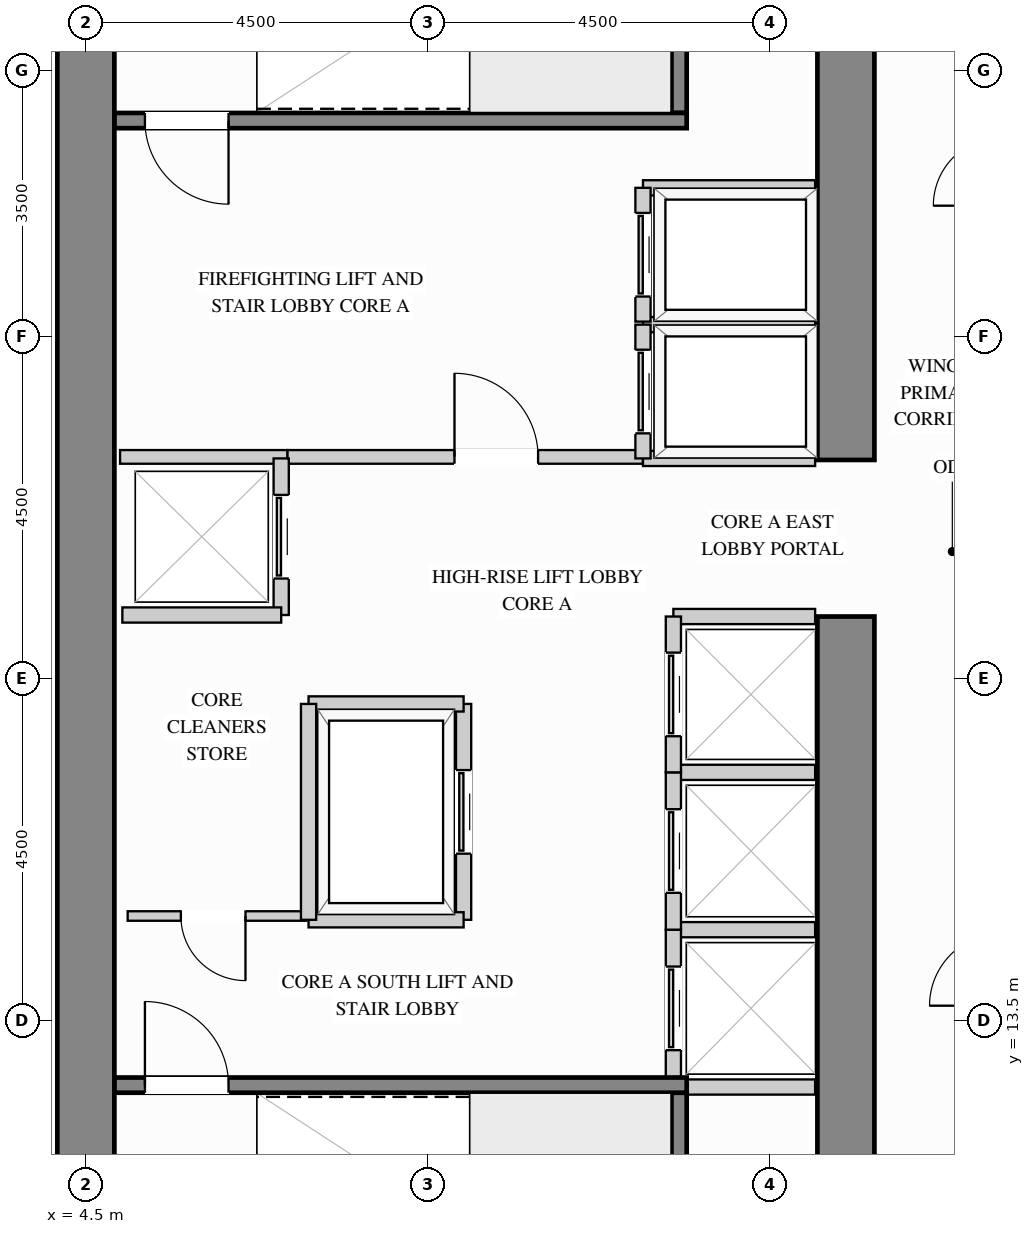
"""IFC4 building model, lengths in metres.
Left out: names, types, materials, properties, quantities, classifications, styles, units other than length and angle.
Written with IfcOpenShell. Run it as: python <this file> out.ifc"""

import sys

from ifc_helpers import new_model, si_unit, direction, frame, frame_2d, origin, place, context, subcontext, project, spatial, rectangle, extrude, source, transform, mapped, element, fill, save


model = new_model("IFC4")
c1 = context("Model", 3, precision=1e-05, world=origin(), true_north=direction((0.0, 1.0)))
c2 = subcontext(c1, "Body", "Model", "MODEL_VIEW")
j1 = project(units=[si_unit("LENGTHUNIT", "METRE"), si_unit("PLANEANGLEUNIT", "RADIAN")], contexts=[c1])
p1 = place(None, origin())
s1 = spatial("IfcSite", under=j1, at=p1, CompositionType="ELEMENT")
p2 = place(p1, origin())
s2 = spatial("IfcBuilding", under=s1, at=p2, CompositionType="ELEMENT")
p3 = place(p2, frame((0.0, 0.0, 91.8)))
s3 = spatial("IfcBuildingStorey", under=s2, at=p3, CompositionType="ELEMENT", Elevation=91.8)
m1 = source(origin(), c2, "Body", "SweptSolid", [
    extrude(rectangle(XDim=9.945, YDim=0.75, at=frame_2d((4.973, 0.0))), origin(), (0.0, 0.0, 1.0), 3.38),
])
p4 = place(p3, frame((14.5, 8.875, 0.0), z_axis=(0.0, 0.0, 1.0), x_axis=(0.0, 1.0, 0.0)))
e1 = element("IfcWall", 1, at=p4, inside=s3, PredefinedType="SHEAR", context=c2, shape_type="MappedRepresentation", body=[
    mapped(m1, transform((0.0, 0.0, 0.0), x_axis=(1.0, 0.0, 0.0), y_axis=(0.0, 1.0, 0.0), z_axis=(0.0, 0.0, 1.0))),
])
m2 = source(origin(), c2, "Body", "SweptSolid", [
    extrude(rectangle(XDim=8.245, YDim=0.75, at=frame_2d((4.123, 0.0))), origin(), (0.0, 0.0, 1.0), 3.38),
])
p5 = place(p3, frame((14.5, 20.88, 0.0), z_axis=(0.0, 0.0, 1.0), x_axis=(0.0, 1.0, 0.0)))
e2 = element("IfcWall", 2, at=p5, inside=s3, PredefinedType="SHEAR", context=c2, shape_type="MappedRepresentation", body=[
    mapped(m2, transform((0.0, 0.0, 0.0), x_axis=(1.0, 0.0, 0.0), y_axis=(0.0, 1.0, 0.0), z_axis=(0.0, 0.0, 1.0))),
])
m3 = source(origin(), c2, "Body", "SweptSolid", [
    extrude(rectangle(XDim=20.25, YDim=0.75, at=frame_2d((10.125, 0.0))), origin(), (0.0, 0.0, 1.0), 3.38),
])
p6 = place(p3, frame((4.5, 8.875, 0.0), z_axis=(0.0, 0.0, 1.0), x_axis=(0.0, 1.0, 0.0)))
e3 = element("IfcWall", 3, at=p6, inside=s3, PredefinedType="SHEAR", context=c2, shape_type="MappedRepresentation", body=[
    mapped(m3, transform((0.0, 0.0, 0.0), x_axis=(1.0, 0.0, 0.0), y_axis=(0.0, 1.0, 0.0), z_axis=(0.0, 0.0, 1.0))),
])
p7 = place(p3, frame((7.15, 20.92, 0.0), z_axis=(0.0, 0.0, 1.0), x_axis=(1.0, 0.0, 0.0)))
e4 = element("IfcWall", 4, at=p7, inside=s3, PredefinedType="PARTITIONING", context=c2, shape_type="SweptSolid", body=[
    extrude(rectangle(XDim=4.68, YDim=0.18, at=frame_2d((2.34, 0.0))), origin(), (0.0, 0.0, 1.0), 3.365),
])
p8 = place(p7, frame((2.2, 0.0, 0.0)))
e5 = element("IfcOpeningElement", 5, at=p8, cuts=e4, PredefinedType="OPENING", context=c2, shape_type="SweptSolid", body=[
    extrude(rectangle(XDim=1.1, YDim=2.15, at=frame_2d((0.55, 1.075))), frame((0.0, 0.1, 0.0), z_axis=(0.0, -1.0, 0.0), x_axis=(1.0, 0.0, 0.0)), (0.0, 0.0, 1.0), 0.2),
])
m4 = source(origin(), c2, "Body", "SweptSolid", [
    extrude(rectangle(XDim=2.2, YDim=0.18, at=frame_2d((1.1, 0.0))), origin(), (0.0, 0.0, 1.0), 3.365),
])
p9 = place(p3, frame((4.95, 20.92, 0.0), z_axis=(0.0, 0.0, 1.0), x_axis=(1.0, 0.0, 0.0)))
e6 = element("IfcWall", 6, at=p9, inside=s3, PredefinedType="PARTITIONING", context=c2, shape_type="MappedRepresentation", body=[
    mapped(m4, transform((0.0, 0.0, 0.0), x_axis=(1.0, 0.0, 0.0), y_axis=(0.0, 1.0, 0.0), z_axis=(0.0, 0.0, 1.0))),
])
p10 = place(p3, frame((5.05, 14.88, 0.0), z_axis=(0.0, 0.0, 1.0), x_axis=(1.0, 0.0, 0.0)))
e7 = element("IfcWall", 7, at=p10, inside=s3, PredefinedType="PARTITIONING", context=c2, shape_type="SweptSolid", body=[
    extrude(rectangle(XDim=2.35, YDim=0.125, at=frame_2d((1.175, 0.0))), origin(), (0.0, 0.0, 1.0), 3.365),
])
p11 = place(p10, frame((0.7, 0.0, 0.0)))
e8 = element("IfcOpeningElement", 8, at=p11, cuts=e7, PredefinedType="OPENING", context=c2, shape_type="SweptSolid", body=[
    extrude(rectangle(XDim=0.85, YDim=2.1, at=frame_2d((0.425, 1.05))), frame((0.0, 0.073, 0.0), z_axis=(0.0, -1.0, 0.0), x_axis=(1.0, 0.0, 0.0)), (0.0, 0.0, 1.0), 0.145),
])
m5 = source(origin(), c2, "Body", "SweptSolid", [
    extrude(rectangle(XDim=2.265, YDim=0.2, at=frame_2d((1.132, 0.0))), origin(), (0.0, 0.0, 1.0), 3.365),
])
for number, where, z_axis, x_axis in (
    (9, (11.83, 22.66, 0.0), (0.0, 0.0, 1.0), (1.0, 0.0, 0.0)),
    (10, (11.83, 20.9, 0.0), (0.0, 0.0, 1.0), (1.0, 0.0, 0.0)),
):
    element("IfcWall", number, at=place(p3, frame(where, z_axis=z_axis, x_axis=x_axis)), inside=s3, PredefinedType="PARTITIONING", context=c2, shape_type="MappedRepresentation", body=[
        mapped(m5, transform((0.0, 0.0, 0.0), x_axis=(1.0, 0.0, 0.0), y_axis=(0.0, 1.0, 0.0), z_axis=(0.0, 0.0, 1.0))),
    ])
p12 = place(p3, frame((11.83, 20.9, 0.0), z_axis=(0.0, 0.0, 1.0), x_axis=(0.0, 1.0, 0.0)))
e11 = element("IfcWall", 11, at=p12, inside=s3, PredefinedType="PARTITIONING", context=c2, shape_type="SweptSolid", body=[
    extrude(rectangle(XDim=1.76, YDim=0.2, at=frame_2d((0.88, 0.0))), origin(), (0.0, 0.0, 1.0), 3.365),
])
p13 = place(p12, frame((0.33, 0.0, 0.0)))
e12 = element("IfcOpeningElement", 12, at=p13, cuts=e11, PredefinedType="OPENING", context=c2, shape_type="SweptSolid", body=[
    extrude(rectangle(XDim=1.1, YDim=2.2, at=frame_2d((0.55, 1.1))), frame((0.0, 0.11, 0.0), z_axis=(0.0, -1.0, 0.0), x_axis=(1.0, 0.0, 0.0)), (0.0, 0.0, 1.0), 0.22),
])
p14 = place(p3, frame((11.83, 24.46, 0.0), z_axis=(0.0, 0.0, 1.0), x_axis=(1.0, 0.0, 0.0)))
e13 = element("IfcWall", 13, at=p14, inside=s3, PredefinedType="PARTITIONING", context=c2, shape_type="MappedRepresentation", body=[
    mapped(m5, transform((0.0, 0.0, 0.0), x_axis=(1.0, 0.0, 0.0), y_axis=(0.0, 1.0, 0.0), z_axis=(0.0, 0.0, 1.0))),
])
p15 = place(p3, frame((11.83, 22.7, 0.0), z_axis=(0.0, 0.0, 1.0), x_axis=(0.0, 1.0, 0.0)))
e14 = element("IfcWall", 14, at=p15, inside=s3, PredefinedType="PARTITIONING", context=c2, shape_type="SweptSolid", body=[
    extrude(rectangle(XDim=1.76, YDim=0.2, at=frame_2d((0.88, 0.0))), origin(), (0.0, 0.0, 1.0), 3.365),
])
p16 = place(p15, frame((0.33, 0.0, 0.0)))
e15 = element("IfcOpeningElement", 15, at=p16, cuts=e14, PredefinedType="OPENING", context=c2, shape_type="SweptSolid", body=[
    extrude(rectangle(XDim=1.1, YDim=2.2, at=frame_2d((0.55, 1.1))), frame((0.0, 0.11, 0.0), z_axis=(0.0, -1.0, 0.0), x_axis=(1.0, 0.0, 0.0)), (0.0, 0.0, 1.0), 0.22),
])
m6 = source(origin(), c2, "Body", "SweptSolid", [
    extrude(rectangle(XDim=1.865, YDim=0.2, at=frame_2d((0.933, 0.0))), origin(), (0.0, 0.0, 1.0), 3.365),
])
for number, where, z_axis, x_axis in (
    (16, (12.23, 14.7, 0.0), (0.0, 0.0, 1.0), (1.0, 0.0, 0.0)),
    (17, (12.23, 12.63, 0.0), (0.0, 0.0, 1.0), (1.0, 0.0, 0.0)),
):
    element("IfcWall", number, at=place(p3, frame(where, z_axis=z_axis, x_axis=x_axis)), inside=s3, PredefinedType="PARTITIONING", context=c2, shape_type="MappedRepresentation", body=[
        mapped(m6, transform((0.0, 0.0, 0.0), x_axis=(1.0, 0.0, 0.0), y_axis=(0.0, 1.0, 0.0), z_axis=(0.0, 0.0, 1.0))),
    ])
p17 = place(p3, frame((12.23, 12.63, 0.0), z_axis=(0.0, 0.0, 1.0), x_axis=(0.0, 1.0, 0.0)))
e18 = element("IfcWall", 18, at=p17, inside=s3, PredefinedType="PARTITIONING", context=c2, shape_type="SweptSolid", body=[
    extrude(rectangle(XDim=2.07, YDim=0.2, at=frame_2d((1.035, 0.0))), origin(), (0.0, 0.0, 1.0), 3.365),
])
p18 = place(p17, frame((0.485, 0.0, 0.0)))
e19 = element("IfcOpeningElement", 19, at=p18, cuts=e18, PredefinedType="OPENING", context=c2, shape_type="SweptSolid", body=[
    extrude(rectangle(XDim=1.1, YDim=2.2, at=frame_2d((0.55, 1.1))), frame((0.0, 0.11, 0.0), z_axis=(0.0, -1.0, 0.0), x_axis=(1.0, 0.0, 0.0)), (0.0, 0.0, 1.0), 0.22),
])
p19 = place(p3, frame((12.23, 16.77, 0.0), z_axis=(0.0, 0.0, 1.0), x_axis=(1.0, 0.0, 0.0)))
e20 = element("IfcWall", 20, at=p19, inside=s3, PredefinedType="PARTITIONING", context=c2, shape_type="MappedRepresentation", body=[
    mapped(m6, transform((0.0, 0.0, 0.0), x_axis=(1.0, 0.0, 0.0), y_axis=(0.0, 1.0, 0.0), z_axis=(0.0, 0.0, 1.0))),
])
p20 = place(p3, frame((12.23, 14.7, 0.0), z_axis=(0.0, 0.0, 1.0), x_axis=(0.0, 1.0, 0.0)))
e21 = element("IfcWall", 21, at=p20, inside=s3, PredefinedType="PARTITIONING", context=c2, shape_type="SweptSolid", body=[
    extrude(rectangle(XDim=2.07, YDim=0.2, at=frame_2d((1.035, 0.0))), origin(), (0.0, 0.0, 1.0), 3.365),
])
p21 = place(p20, frame((0.485, 0.0, 0.0)))
e22 = element("IfcOpeningElement", 22, at=p21, cuts=e21, PredefinedType="OPENING", context=c2, shape_type="SweptSolid", body=[
    extrude(rectangle(XDim=1.1, YDim=2.2, at=frame_2d((0.55, 1.1))), frame((0.0, 0.11, 0.0), z_axis=(0.0, -1.0, 0.0), x_axis=(1.0, 0.0, 0.0)), (0.0, 0.0, 1.0), 0.22),
])
p22 = place(p3, frame((12.23, 18.82, 0.0), z_axis=(0.0, 0.0, 1.0), x_axis=(1.0, 0.0, 0.0)))
e23 = element("IfcWall", 23, at=p22, inside=s3, PredefinedType="PARTITIONING", context=c2, shape_type="MappedRepresentation", body=[
    mapped(m6, transform((0.0, 0.0, 0.0), x_axis=(1.0, 0.0, 0.0), y_axis=(0.0, 1.0, 0.0), z_axis=(0.0, 0.0, 1.0))),
])
p23 = place(p3, frame((12.23, 16.77, 0.0), z_axis=(0.0, 0.0, 1.0), x_axis=(0.0, 1.0, 0.0)))
e24 = element("IfcWall", 24, at=p23, inside=s3, PredefinedType="PARTITIONING", context=c2, shape_type="SweptSolid", body=[
    extrude(rectangle(XDim=2.05, YDim=0.2, at=frame_2d((1.025, 0.0))), origin(), (0.0, 0.0, 1.0), 3.365),
])
p24 = place(p23, frame((0.475, 0.0, 0.0)))
e25 = element("IfcOpeningElement", 25, at=p24, cuts=e24, PredefinedType="OPENING", context=c2, shape_type="SweptSolid", body=[
    extrude(rectangle(XDim=1.1, YDim=2.2, at=frame_2d((0.55, 1.1))), frame((0.0, 0.11, 0.0), z_axis=(0.0, -1.0, 0.0), x_axis=(1.0, 0.0, 0.0)), (0.0, 0.0, 1.0), 0.22),
])
p25 = place(p3, frame((7.07, 18.84, 0.0), z_axis=(0.0, 0.0, 1.0), x_axis=(0.0, 1.0, 0.0)))
e26 = element("IfcWall", 26, at=p25, inside=s3, PredefinedType="PARTITIONING", context=c2, shape_type="SweptSolid", body=[
    extrude(rectangle(XDim=2.06, YDim=0.2, at=frame_2d((1.03, 0.0))), origin(), (0.0, 0.0, 1.0), 3.365),
])
p26 = place(p25, frame((0.48, 0.0, 0.0)))
e27 = element("IfcOpeningElement", 27, at=p26, cuts=e26, PredefinedType="OPENING", context=c2, shape_type="SweptSolid", body=[
    extrude(rectangle(XDim=1.1, YDim=2.2, at=frame_2d((0.55, 1.1))), frame((0.0, 0.11, 0.0), z_axis=(0.0, -1.0, 0.0), x_axis=(1.0, 0.0, 0.0)), (0.0, 0.0, 1.0), 0.22),
])
m7 = source(origin(), c2, "Body", "SweptSolid", [
    extrude(rectangle(XDim=2.09, YDim=0.2, at=frame_2d((1.045, 0.0))), origin(), (0.0, 0.0, 1.0), 3.365),
])
p27 = place(p3, frame((4.98, 18.84, 0.0), z_axis=(0.0, 0.0, 1.0), x_axis=(1.0, 0.0, 0.0)))
e28 = element("IfcWall", 28, at=p27, inside=s3, PredefinedType="PARTITIONING", context=c2, shape_type="MappedRepresentation", body=[
    mapped(m7, transform((0.0, 0.0, 0.0), x_axis=(1.0, 0.0, 0.0), y_axis=(0.0, 1.0, 0.0), z_axis=(0.0, 0.0, 1.0))),
])
p28 = place(p3, frame((9.47, 14.83, 0.0), z_axis=(0.0, 0.0, 1.0), x_axis=(0.0, 1.0, 0.0)))
e29 = element("IfcWall", 29, at=p28, inside=s3, PredefinedType="PARTITIONING", context=c2, shape_type="SweptSolid", body=[
    extrude(rectangle(XDim=2.84, YDim=0.2, at=frame_2d((1.42, 0.0))), origin(), (0.0, 0.0, 1.0), 3.365),
])
p29 = place(p28, frame((0.87, 0.0, 0.0)))
e30 = element("IfcOpeningElement", 30, at=p29, cuts=e29, PredefinedType="OPENING", context=c2, shape_type="SweptSolid", body=[
    extrude(rectangle(XDim=1.1, YDim=2.2, at=frame_2d((0.55, 1.1))), frame((0.0, 0.11, 0.0), z_axis=(0.0, -1.0, 0.0), x_axis=(1.0, 0.0, 0.0)), (0.0, 0.0, 1.0), 0.22),
])
m8 = source(origin(), c2, "Body", "SweptSolid", [
    extrude(rectangle(XDim=2.04, YDim=0.2, at=frame_2d((1.02, 0.0))), origin(), (0.0, 0.0, 1.0), 3.365),
])
for number, where, z_axis, x_axis in (
    (31, (7.43, 17.67, 0.0), (0.0, 0.0, 1.0), (1.0, 0.0, 0.0)),
    (32, (7.43, 14.83, 0.0), (0.0, 0.0, 1.0), (1.0, 0.0, 0.0)),
):
    element("IfcWall", number, at=place(p3, frame(where, z_axis=z_axis, x_axis=x_axis)), inside=s3, PredefinedType="PARTITIONING", context=c2, shape_type="MappedRepresentation", body=[
        mapped(m8, transform((0.0, 0.0, 0.0), x_axis=(1.0, 0.0, 0.0), y_axis=(0.0, 1.0, 0.0), z_axis=(0.0, 0.0, 1.0))),
    ])
m9 = source(origin(), c2, "Body", "SweptSolid", [
    extrude(rectangle(XDim=2.84, YDim=0.2, at=frame_2d((1.42, 0.0))), origin(), (0.0, 0.0, 1.0), 3.365),
])
p30 = place(p3, frame((7.43, 14.83, 0.0), z_axis=(0.0, 0.0, 1.0), x_axis=(0.0, 1.0, 0.0)))
e33 = element("IfcWall", 33, at=p30, inside=s3, PredefinedType="PARTITIONING", context=c2, shape_type="MappedRepresentation", body=[
    mapped(m9, transform((0.0, 0.0, 0.0), x_axis=(1.0, 0.0, 0.0), y_axis=(0.0, 1.0, 0.0), z_axis=(0.0, 0.0, 1.0))),
])
m10 = source(origin(), c2, "Body", "SweptSolid", [
    extrude(rectangle(XDim=3.678, YDim=0.2, at=frame_2d((1.839, 0.0))), origin(), (0.0, 0.0, 1.0), 3.38),
])
p31 = place(p3, frame((12.305, 8.877, 0.0), z_axis=(0.0, 0.0, 1.0), x_axis=(0.0, 1.0, 0.0)))
e34 = element("IfcWall", 34, at=p31, inside=s3, PredefinedType="SHEAR", context=c2, shape_type="MappedRepresentation", body=[
    mapped(m10, transform((0.0, 0.0, 0.0), x_axis=(1.0, 0.0, 0.0), y_axis=(0.0, 1.0, 0.0), z_axis=(0.0, 0.0, 1.0))),
])
p32 = place(p3, frame((4.877, 12.655, 0.0), z_axis=(0.0, 0.0, 1.0), x_axis=(1.0, 0.0, 0.0)))
e35 = element("IfcWall", 35, at=p32, inside=s3, PredefinedType="SHEAR", context=c2, shape_type="SweptSolid", body=[
    extrude(rectangle(XDim=7.528, YDim=0.2, at=frame_2d((3.764, 0.0))), origin(), (0.0, 0.0, 1.0), 3.38),
])
p33 = place(p32, frame((0.4, 0.0, 0.0)))
e36 = element("IfcOpeningElement", 36, at=p33, cuts=e35, PredefinedType="OPENING", context=c2, shape_type="SweptSolid", body=[
    extrude(rectangle(XDim=1.1, YDim=2.15, at=frame_2d((0.55, 1.075))), frame((0.0, 0.11, 0.0), z_axis=(0.0, -1.0, 0.0), x_axis=(1.0, 0.0, 0.0)), (0.0, 0.0, 1.0), 0.22),
])
p34 = place(p3, frame((12.305, 25.445, 0.0), z_axis=(0.0, 0.0, 1.0), x_axis=(0.0, 1.0, 0.0)))
e37 = element("IfcWall", 37, at=p34, inside=s3, PredefinedType="SHEAR", context=c2, shape_type="MappedRepresentation", body=[
    mapped(m10, transform((0.0, 0.0, 0.0), x_axis=(1.0, 0.0, 0.0), y_axis=(0.0, 1.0, 0.0), z_axis=(0.0, 0.0, 1.0))),
])
p35 = place(p3, frame((4.877, 25.345, 0.0), z_axis=(0.0, 0.0, 1.0), x_axis=(1.0, 0.0, 0.0)))
e38 = element("IfcWall", 38, at=p35, inside=s3, PredefinedType="SHEAR", context=c2, shape_type="SweptSolid", body=[
    extrude(rectangle(XDim=7.528, YDim=0.2, at=frame_2d((3.764, 0.0))), origin(), (0.0, 0.0, 1.0), 3.38),
])
p36 = place(p35, frame((0.4, 0.0, 0.0)))
e39 = element("IfcOpeningElement", 39, at=p36, cuts=e38, PredefinedType="OPENING", context=c2, shape_type="SweptSolid", body=[
    extrude(rectangle(XDim=1.1, YDim=2.15, at=frame_2d((0.55, 1.075))), frame((0.0, 0.11, 0.0), z_axis=(0.0, -1.0, 0.0), x_axis=(1.0, 0.0, 0.0)), (0.0, 0.0, 1.0), 0.22),
])
m11 = source(origin(), c2, "Body", "SweptSolid", [
    extrude(rectangle(XDim=1.1, YDim=2.15, at=frame_2d((0.55, 1.075))), frame((0.0, 0.025, 0.0), z_axis=(0.0, -1.0, 0.0), x_axis=(1.0, 0.0, 0.0)), (0.0, 0.0, 1.0), 0.05),
])
p37 = place(p8, origin())
e40 = element("IfcDoor", 40, at=p37, inside=s3, OperationType="SINGLE_SWING_LEFT", PredefinedType="DOOR", context=c2, shape_type="MappedRepresentation", body=[
    mapped(m11, transform((0.0, 0.0, 0.0), x_axis=(1.0, 0.0, 0.0), y_axis=(0.0, 1.0, 0.0), z_axis=(0.0, 0.0, 1.0))),
])
fill(e5, e40)
m12 = source(origin(), c2, "Body", "SweptSolid", [
    extrude(rectangle(XDim=1.1, YDim=2.2, at=frame_2d((0.55, 1.1))), frame((0.0, 0.025, 0.0), z_axis=(0.0, -1.0, 0.0), x_axis=(1.0, 0.0, 0.0)), (0.0, 0.0, 1.0), 0.05),
])
p38 = place(p13, origin())
e41 = element("IfcDoor", 41, at=p38, inside=s3, OperationType="SLIDING_TO_LEFT", PredefinedType="DOOR", context=c2, shape_type="MappedRepresentation", body=[
    mapped(m12, transform((0.0, 0.0, 0.0), x_axis=(1.0, 0.0, 0.0), y_axis=(0.0, 1.0, 0.0), z_axis=(0.0, 0.0, 1.0))),
])
fill(e12, e41)
p39 = place(p16, origin())
e42 = element("IfcDoor", 42, at=p39, inside=s3, OperationType="SLIDING_TO_LEFT", PredefinedType="DOOR", context=c2, shape_type="MappedRepresentation", body=[
    mapped(m12, transform((0.0, 0.0, 0.0), x_axis=(1.0, 0.0, 0.0), y_axis=(0.0, 1.0, 0.0), z_axis=(0.0, 0.0, 1.0))),
])
fill(e15, e42)
p40 = place(p18, origin())
e43 = element("IfcDoor", 43, at=p40, inside=s3, OperationType="SLIDING_TO_LEFT", PredefinedType="DOOR", context=c2, shape_type="MappedRepresentation", body=[
    mapped(m12, transform((0.0, 0.0, 0.0), x_axis=(1.0, 0.0, 0.0), y_axis=(0.0, 1.0, 0.0), z_axis=(0.0, 0.0, 1.0))),
])
fill(e19, e43)
p41 = place(p21, origin())
e44 = element("IfcDoor", 44, at=p41, inside=s3, OperationType="SLIDING_TO_LEFT", PredefinedType="DOOR", context=c2, shape_type="MappedRepresentation", body=[
    mapped(m12, transform((0.0, 0.0, 0.0), x_axis=(1.0, 0.0, 0.0), y_axis=(0.0, 1.0, 0.0), z_axis=(0.0, 0.0, 1.0))),
])
fill(e22, e44)
p42 = place(p24, origin())
e45 = element("IfcDoor", 45, at=p42, inside=s3, OperationType="SLIDING_TO_LEFT", PredefinedType="DOOR", context=c2, shape_type="MappedRepresentation", body=[
    mapped(m12, transform((0.0, 0.0, 0.0), x_axis=(1.0, 0.0, 0.0), y_axis=(0.0, 1.0, 0.0), z_axis=(0.0, 0.0, 1.0))),
])
fill(e25, e45)
p43 = place(p26, origin())
e46 = element("IfcDoor", 46, at=p43, inside=s3, OperationType="SLIDING_TO_LEFT", PredefinedType="DOOR", context=c2, shape_type="MappedRepresentation", body=[
    mapped(m12, transform((0.0, 0.0, 0.0), x_axis=(1.0, 0.0, 0.0), y_axis=(0.0, 1.0, 0.0), z_axis=(0.0, 0.0, 1.0))),
])
fill(e27, e46)
p44 = place(p29, origin())
e47 = element("IfcDoor", 47, at=p44, inside=s3, OperationType="SLIDING_TO_LEFT", PredefinedType="DOOR", context=c2, shape_type="MappedRepresentation", body=[
    mapped(m12, transform((0.0, 0.0, 0.0), x_axis=(1.0, 0.0, 0.0), y_axis=(0.0, 1.0, 0.0), z_axis=(0.0, 0.0, 1.0))),
])
fill(e30, e47)
m13 = source(origin(), c2, "Body", "SweptSolid", [
    extrude(rectangle(XDim=0.85, YDim=2.1, at=frame_2d((0.425, 1.05))), frame((0.0, 0.025, 0.0), z_axis=(0.0, -1.0, 0.0), x_axis=(1.0, 0.0, 0.0)), (0.0, 0.0, 1.0), 0.05),
])
p45 = place(p11, origin())
e48 = element("IfcDoor", 48, at=p45, inside=s3, OperationType="SINGLE_SWING_RIGHT", PredefinedType="DOOR", context=c2, shape_type="MappedRepresentation", body=[
    mapped(m13, transform((0.0, 0.0, 0.0), x_axis=(1.0, 0.0, 0.0), y_axis=(0.0, 1.0, 0.0), z_axis=(0.0, 0.0, 1.0))),
])
fill(e8, e48)
m14 = source(origin(), c2, "Body", "SweptSolid", [
    extrude(rectangle(XDim=1.1, YDim=2.15, at=frame_2d((0.55, 1.075))), frame((0.0, 0.025, 0.0), z_axis=(0.0, -1.0, 0.0), x_axis=(1.0, 0.0, 0.0)), (0.0, 0.0, 1.0), 0.05),
])
p46 = place(p33, origin())
e49 = element("IfcDoor", 49, at=p46, inside=s3, OperationType="SINGLE_SWING_LEFT", PredefinedType="DOOR", context=c2, shape_type="MappedRepresentation", body=[
    mapped(m14, transform((0.0, 0.0, 0.0), x_axis=(1.0, 0.0, 0.0), y_axis=(0.0, 1.0, 0.0), z_axis=(0.0, 0.0, 1.0))),
])
fill(e36, e49)
p47 = place(p36, origin())
e50 = element("IfcDoor", 50, at=p47, inside=s3, OperationType="SINGLE_SWING_RIGHT", PredefinedType="DOOR", context=c2, shape_type="MappedRepresentation", body=[
    mapped(m14, transform((0.0, 0.0, 0.0), x_axis=(1.0, 0.0, 0.0), y_axis=(0.0, 1.0, 0.0), z_axis=(0.0, 0.0, 1.0))),
])
fill(e39, e50)
save(model, sys.argv[1])
